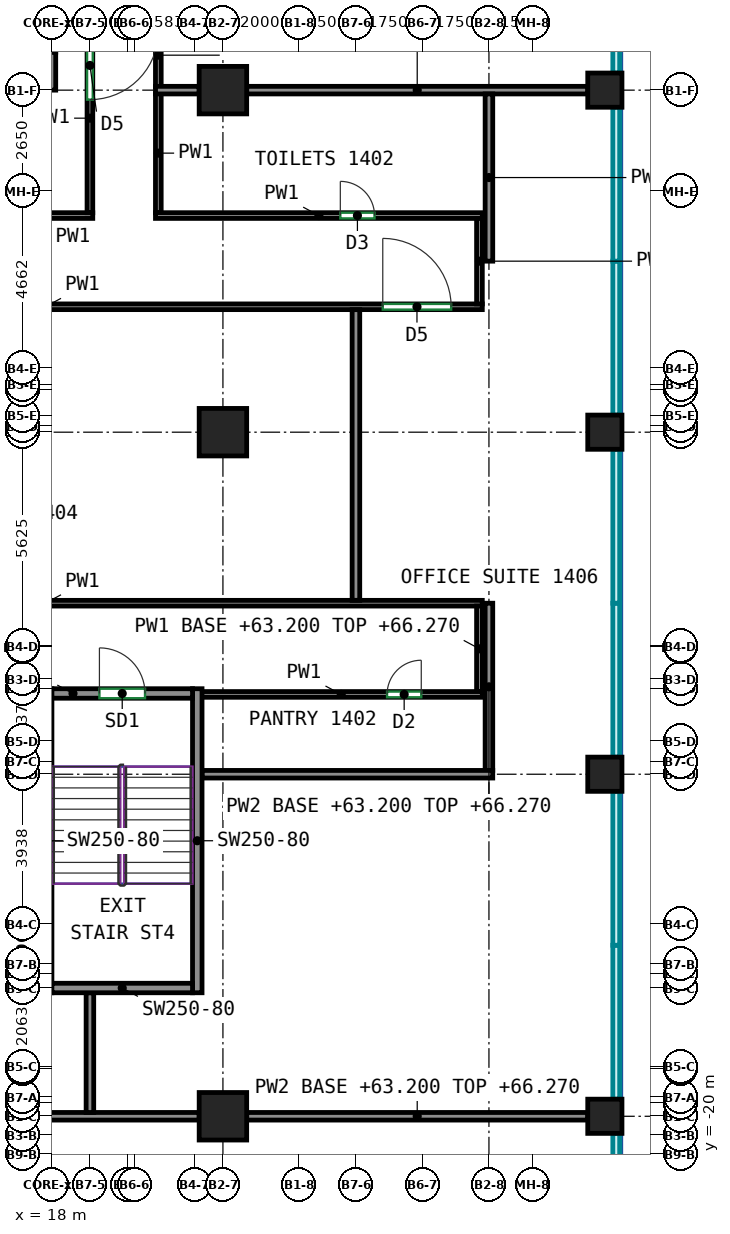
"""IFC4 building model, lengths in metres.
Left out: names, types, materials, properties, quantities, classifications, styles, units other than length and angle.
Written with IfcOpenShell. Run it as: python <this file> out.ifc"""

import sys

from ifc_helpers import new_model, si_unit, direction, frame, frame_2d, origin, origin_2d, place, context, subcontext, project, spatial, rectangle, extrude, source, transform, mapped, element, fill, save


model = new_model("IFC4")
c1 = context("Model", 3, precision=1e-05, world=origin(), true_north=direction((0.0, 1.0)))
c2 = subcontext(c1, "Body", "Model", "MODEL_VIEW")
j1 = project(units=[si_unit("LENGTHUNIT", "METRE"), si_unit("PLANEANGLEUNIT", "RADIAN")], contexts=[c1])
p1 = place(None, origin())
s1 = spatial("IfcSite", under=j1, at=p1, CompositionType="ELEMENT")
p2 = place(p1, origin())
s2 = spatial("IfcBuilding", under=s1, at=p2, CompositionType="ELEMENT")
p3 = place(p2, frame((0.0, 0.0, 63.2)))
s3 = spatial("IfcBuildingStorey", under=s2, at=p3, CompositionType="ELEMENT", Elevation=63.2)
m1 = source(origin(), c2, "Body", "SweptSolid", [
    extrude(rectangle(XDim=1.25, YDim=1.25, at=origin_2d()), origin(), (0.0, 0.0, 1.0), 3.72),
])
for number, where, z_axis, x_axis in (
    (1, (22.5, -19.0, 0.0), (0.0, 0.0, 1.0), (1.0, 0.0, 0.0)),
    (2, (22.5, -1.0, 0.0), (0.0, 0.0, 1.0), (1.0, 0.0, 0.0)),
    (3, (22.5, 8.0, 0.0), (0.0, 0.0, 1.0), (1.0, 0.0, 0.0)),
):
    element("IfcColumn", number, at=place(p3, frame(where, z_axis=z_axis, x_axis=x_axis)), inside=s3, PredefinedType="COLUMN", context=c2, shape_type="MappedRepresentation", body=[
        mapped(m1, transform((0.0, 0.0, 0.0))),
    ])
m2 = source(origin(), c2, "Body", "SweptSolid", [
    extrude(rectangle(XDim=0.9, YDim=0.9, at=origin_2d()), origin(), (0.0, 0.0, 1.0), 3.72),
])
for number, where, z_axis, x_axis in (
    (4, (32.55, -19.0, 0.0), (0.0, 0.0, 1.0), (1.0, 0.0, 0.0)),
    (5, (32.55, -10.0, 0.0), (0.0, 0.0, 1.0), (1.0, 0.0, 0.0)),
    (6, (32.55, -1.0, 0.0), (0.0, 0.0, 1.0), (1.0, 0.0, 0.0)),
    (7, (32.55, 8.0, 0.0), (0.0, 0.0, 1.0), (1.0, 0.0, 0.0)),
):
    element("IfcColumn", number, at=place(p3, frame(where, z_axis=z_axis, x_axis=x_axis)), inside=s3, PredefinedType="COLUMN", context=c2, shape_type="MappedRepresentation", body=[
        mapped(m2, transform((0.0, 0.0, 0.0))),
    ])
m3 = source(origin(), c2, "Body", "SweptSolid", [
    extrude(rectangle(XDim=5.63, YDim=1.0, at=frame_2d((2.815, 0.0))), origin(), (0.0, 0.0, 1.0), 3.72),
])
p4 = place(p3, frame((12.47, 8.5, 0.0), z_axis=(0.0, 0.0, 1.0), x_axis=(1.0, 0.0, 0.0)))
e8 = element("IfcWall", 8, at=p4, inside=s3, PredefinedType="SHEAR", context=c2, shape_type="MappedRepresentation", body=[
    mapped(m3, transform((0.0, 0.0, 0.0))),
])
p5 = place(p4, frame((2.18, 0.0, 0.0)))
e9 = element("IfcOpeningElement", 9, at=p5, cuts=e8, PredefinedType="OPENING", context=c2, shape_type="SweptSolid", body=[
    extrude(rectangle(XDim=1.2, YDim=2.1, at=frame_2d((0.6, 1.05))), frame((0.0, 0.51, 0.0), z_axis=(0.0, -1.0, 0.0), x_axis=(1.0, 0.0, 0.0)), (0.0, 0.0, 1.0), 1.02),
])
m4 = source(origin(), c2, "Body", "SweptSolid", [
    extrude(rectangle(XDim=8.0, YDim=0.25, at=frame_2d((4.0, 0.0))), origin(), (0.0, 0.0, 1.0), 3.72),
])
p6 = place(p3, frame((21.825, -15.75, 0.0), z_axis=(0.0, 0.0, 1.0), x_axis=(0.0, 1.0, 0.0)))
e10 = element("IfcWall", 10, at=p6, inside=s3, PredefinedType="SHEAR", context=c2, shape_type="MappedRepresentation", body=[
    mapped(m4, transform((0.0, 0.0, 0.0))),
])
m5 = source(origin(), c2, "Body", "SweptSolid", [
    extrude(rectangle(XDim=3.7, YDim=0.25, at=frame_2d((1.85, 0.0))), origin(), (0.0, 0.0, 1.0), 3.72),
])
p7 = place(p3, frame((18.0, -15.625, 0.0), z_axis=(0.0, 0.0, 1.0), x_axis=(1.0, 0.0, 0.0)))
e11 = element("IfcWall", 11, at=p7, inside=s3, PredefinedType="SHEAR", context=c2, shape_type="MappedRepresentation", body=[
    mapped(m5, transform((0.0, 0.0, 0.0))),
])
p8 = place(p3, frame((18.0, -7.875, 0.0), z_axis=(0.0, 0.0, 1.0), x_axis=(1.0, 0.0, 0.0)))
e12 = element("IfcWall", 12, at=p8, inside=s3, PredefinedType="SHEAR", context=c2, shape_type="MappedRepresentation", body=[
    mapped(m5, transform((0.0, 0.0, 0.0))),
])
p9 = place(p8, frame((1.25, 0.0, 0.0)))
e13 = element("IfcOpeningElement", 13, at=p9, cuts=e12, PredefinedType="OPENING", context=c2, shape_type="SweptSolid", body=[
    extrude(rectangle(XDim=1.2, YDim=2.1, at=frame_2d((0.6, 1.05))), frame((0.0, 0.135, 0.0), z_axis=(0.0, -1.0, 0.0), x_axis=(1.0, 0.0, 0.0)), (0.0, 0.0, 1.0), 0.27),
])
p10 = place(p3, frame((6.325, 2.3, 0.0), z_axis=(0.0, 0.0, 1.0), x_axis=(1.0, 0.0, 0.0)))
e14 = element("IfcWall", 14, at=p10, inside=s3, PredefinedType="PARTITIONING", context=c2, shape_type="SweptSolid", body=[
    extrude(rectangle(XDim=23.0, YDim=0.15, at=frame_2d((11.5, 0.0))), origin(), (0.0, 0.0, 1.0), 3.72),
])
p11 = place(p10, frame((9.443, 0.0, 0.0)))
e15 = element("IfcOpeningElement", 15, at=p11, cuts=e14, PredefinedType="OPENING", context=c2, shape_type="SweptSolid", body=[
    extrude(rectangle(XDim=1.0, YDim=2.1, at=frame_2d((0.5, 1.05))), frame((0.0, 0.085, 0.0), z_axis=(0.0, -1.0, 0.0), x_axis=(1.0, 0.0, 0.0)), (0.0, 0.0, 1.0), 0.17),
])
p12 = place(p10, frame((20.381, 0.0, 0.0)))
e16 = element("IfcOpeningElement", 16, at=p12, cuts=e14, PredefinedType="OPENING", context=c2, shape_type="SweptSolid", body=[
    extrude(rectangle(XDim=1.8, YDim=2.1, at=frame_2d((0.9, 1.05))), frame((0.0, 0.085, 0.0), z_axis=(0.0, -1.0, 0.0), x_axis=(1.0, 0.0, 0.0)), (0.0, 0.0, 1.0), 0.17),
])
p13 = place(p3, frame((6.325, -5.5, 0.0), z_axis=(0.0, 0.0, 1.0), x_axis=(1.0, 0.0, 0.0)))
e17 = element("IfcWall", 17, at=p13, inside=s3, PredefinedType="PARTITIONING", context=c2, shape_type="SweptSolid", body=[
    extrude(rectangle(XDim=23.0, YDim=0.15, at=frame_2d((11.5, 0.0))), origin(), (0.0, 0.0, 1.0), 3.72),
])
p14 = place(p3, frame((16.075, 4.7, 0.0), z_axis=(0.0, 0.0, 1.0), x_axis=(1.0, 0.0, 0.0)))
e18 = element("IfcWall", 18, at=p14, inside=s3, PredefinedType="PARTITIONING", context=c2, shape_type="SweptSolid", body=[
    extrude(rectangle(XDim=3.0, YDim=0.15, at=frame_2d((1.5, 0.0))), origin(), (0.0, 0.0, 1.0), 3.72),
])
p15 = place(p3, frame((19.0, 9.75, 0.0), z_axis=(0.0, 0.0, 1.0), x_axis=(0.0, -1.0, 0.0)))
e19 = element("IfcWall", 19, at=p15, inside=s3, PredefinedType="PARTITIONING", context=c2, shape_type="SweptSolid", body=[
    extrude(rectangle(XDim=4.975, YDim=0.15, at=frame_2d((2.488, 0.0))), origin(), (0.0, 0.0, 1.0), 3.72),
])
p16 = place(p15, frame((0.2, 0.0, 0.0)))
e20 = element("IfcOpeningElement", 20, at=p16, cuts=e19, PredefinedType="OPENING", context=c2, shape_type="SweptSolid", body=[
    extrude(rectangle(XDim=1.8, YDim=2.1, at=frame_2d((0.9, 1.05))), frame((0.0, 0.085, 0.0), z_axis=(0.0, -1.0, 0.0), x_axis=(1.0, 0.0, 0.0)), (0.0, 0.0, 1.0), 0.17),
])
p17 = place(p3, frame((20.8, 8.09, 0.0), z_axis=(0.0, 0.0, 1.0), x_axis=(0.0, 1.0, 0.0)))
e21 = element("IfcWall", 21, at=p17, inside=s3, PredefinedType="PARTITIONING", context=c2, shape_type="SweptSolid", body=[
    extrude(rectangle(XDim=1.66, YDim=0.15, at=frame_2d((0.83, 0.0))), origin(), (0.0, 0.0, 1.0), 3.72),
])
p18 = place(p3, frame((20.8, 4.775, 0.0), z_axis=(0.0, 0.0, 1.0), x_axis=(0.0, 1.0, 0.0)))
e22 = element("IfcWall", 22, at=p18, inside=s3, PredefinedType="PARTITIONING", context=c2, shape_type="SweptSolid", body=[
    extrude(rectangle(XDim=3.135, YDim=0.15, at=frame_2d((1.567, 0.0))), origin(), (0.0, 0.0, 1.0), 3.72),
])
p19 = place(p3, frame((20.725, 4.7, 0.0), z_axis=(0.0, 0.0, 1.0), x_axis=(1.0, 0.0, 0.0)))
e23 = element("IfcWall", 23, at=p19, inside=s3, PredefinedType="PARTITIONING", context=c2, shape_type="SweptSolid", body=[
    extrude(rectangle(XDim=8.6, YDim=0.15, at=frame_2d((4.3, 0.0))), origin(), (0.0, 0.0, 1.0), 3.72),
])
p20 = place(p19, frame((4.864, 0.0, 0.0)))
e24 = element("IfcOpeningElement", 24, at=p20, cuts=e23, PredefinedType="OPENING", context=c2, shape_type="SweptSolid", body=[
    extrude(rectangle(XDim=0.9, YDim=2.1, at=frame_2d((0.45, 1.05))), frame((0.0, 0.085, 0.0), z_axis=(0.0, -1.0, 0.0), x_axis=(1.0, 0.0, 0.0)), (0.0, 0.0, 1.0), 0.17),
])
p21 = place(p3, frame((29.25, -7.825, 0.0), z_axis=(0.0, 0.0, 1.0), x_axis=(0.0, 1.0, 0.0)))
e25 = element("IfcWall", 25, at=p21, inside=s3, PredefinedType="PARTITIONING", context=c2, shape_type="SweptSolid", body=[
    extrude(rectangle(XDim=2.25, YDim=0.15, at=frame_2d((1.125, 0.0))), origin(), (0.0, 0.0, 1.0), 3.07),
])
p22 = place(p3, frame((21.9, -7.9, 0.0), z_axis=(0.0, 0.0, 1.0), x_axis=(1.0, 0.0, 0.0)))
e26 = element("IfcWall", 26, at=p22, inside=s3, PredefinedType="PARTITIONING", context=c2, shape_type="SweptSolid", body=[
    extrude(rectangle(XDim=7.425, YDim=0.15, at=frame_2d((3.712, 0.0))), origin(), (0.0, 0.0, 1.0), 3.72),
])
p23 = place(p22, frame((4.919, 0.0, 0.0)))
e27 = element("IfcOpeningElement", 27, at=p23, cuts=e26, PredefinedType="OPENING", context=c2, shape_type="SweptSolid", body=[
    extrude(rectangle(XDim=0.9, YDim=2.1, at=frame_2d((0.45, 1.05))), frame((0.0, 0.085, 0.0), z_axis=(0.0, -1.0, 0.0), x_axis=(1.0, 0.0, 0.0)), (0.0, 0.0, 1.0), 0.17),
])
p24 = place(p3, frame((29.25, 2.375, 0.0), z_axis=(0.0, 0.0, 1.0), x_axis=(0.0, 1.0, 0.0)))
e28 = element("IfcWall", 28, at=p24, inside=s3, PredefinedType="PARTITIONING", context=c2, shape_type="SweptSolid", body=[
    extrude(rectangle(XDim=2.25, YDim=0.15, at=frame_2d((1.125, 0.0))), origin(), (0.0, 0.0, 1.0), 3.07),
])
p25 = place(p3, frame((16.125, -19.0, 0.0), z_axis=(0.0, 0.0, 1.0), x_axis=(1.0, 0.0, 0.0)))
e29 = element("IfcWall", 29, at=p25, inside=s3, PredefinedType="PARTITIONING", context=c2, shape_type="SweptSolid", body=[
    extrude(rectangle(XDim=5.75, YDim=0.2, at=frame_2d((2.875, 0.0))), origin(), (0.0, 0.0, 1.0), 3.72),
])
p26 = place(p3, frame((23.125, -19.0, 0.0), z_axis=(0.0, 0.0, 1.0), x_axis=(1.0, 0.0, 0.0)))
e30 = element("IfcWall", 30, at=p26, inside=s3, PredefinedType="PARTITIONING", context=c2, shape_type="SweptSolid", body=[
    extrude(rectangle(XDim=8.975, YDim=0.2, at=frame_2d((4.488, 0.0))), origin(), (0.0, 0.0, 1.0), 3.07),
])
p27 = place(p3, frame((26.0, -5.424, 0.0), z_axis=(0.0, 0.0, 1.0), x_axis=(0.0, 1.0, 0.0)))
e31 = element("IfcWall", 31, at=p27, inside=s3, PredefinedType="PARTITIONING", context=c2, shape_type="SweptSolid", body=[
    extrude(rectangle(XDim=7.648, YDim=0.2, at=frame_2d((3.824, 0.0))), origin(), (0.0, 0.0, 1.0), 3.72),
])
p28 = place(p3, frame((19.0, -18.9, 0.0), z_axis=(0.0, 0.0, 1.0), x_axis=(0.0, 1.0, 0.0)))
e32 = element("IfcWall", 32, at=p28, inside=s3, PredefinedType="PARTITIONING", context=c2, shape_type="SweptSolid", body=[
    extrude(rectangle(XDim=3.15, YDim=0.2, at=frame_2d((1.575, 0.0))), origin(), (0.0, 0.0, 1.0), 3.72),
])
p29 = place(p3, frame((23.125, 8.0, 0.0), z_axis=(0.0, 0.0, 1.0), x_axis=(1.0, 0.0, 0.0)))
e33 = element("IfcWall", 33, at=p29, inside=s3, PredefinedType="PARTITIONING", context=c2, shape_type="SweptSolid", body=[
    extrude(rectangle(XDim=8.975, YDim=0.2, at=frame_2d((4.488, 0.0))), origin(), (0.0, 0.0, 1.0), 3.07),
])
p30 = place(p3, frame((20.726, 8.0, 0.0), z_axis=(0.0, 0.0, 1.0), x_axis=(1.0, 0.0, 0.0)))
e34 = element("IfcWall", 34, at=p30, inside=s3, PredefinedType="PARTITIONING", context=c2, shape_type="SweptSolid", body=[
    extrude(rectangle(XDim=1.149, YDim=0.2, at=frame_2d((0.574, 0.0))), origin(), (0.0, 0.0, 1.0), 3.72),
])
for number, where, z_axis, x_axis in (
    (35, (29.5, 3.5, 0.0), (0.0, 0.0, 1.0), (0.0, 1.0, 0.0)),
    (36, (29.5, -9.9, 0.0), (0.0, 0.0, 1.0), (0.0, 1.0, 0.0)),
):
    element("IfcWall", number, at=place(p3, frame(where, z_axis=z_axis, x_axis=x_axis)), inside=s3, PredefinedType="PARTITIONING", context=c2, shape_type="SweptSolid", body=[
        extrude(rectangle(XDim=4.4, YDim=0.2, at=frame_2d((2.2, 0.0))), origin(), (0.0, 0.0, 1.0), 3.07),
    ])
p31 = place(p3, frame((21.95, -10.0, 0.0), z_axis=(0.0, 0.0, 1.0), x_axis=(1.0, 0.0, 0.0)))
e37 = element("IfcWall", 37, at=p31, inside=s3, PredefinedType="PARTITIONING", context=c2, shape_type="SweptSolid", body=[
    extrude(rectangle(XDim=7.65, YDim=0.2, at=frame_2d((3.825, 0.0))), origin(), (0.0, 0.0, 1.0), 3.72),
])
p32 = place(p9, origin())
e38 = element("IfcDoor", 38, at=p32, inside=s3, OperationType="DOUBLE_DOOR_SINGLE_SWING", PredefinedType="DOOR", context=c2, shape_type="SweptSolid", body=[
    extrude(rectangle(XDim=1.2, YDim=2.1, at=frame_2d((0.6, 1.05))), frame((0.0, 0.025, 0.0), z_axis=(0.0, -1.0, 0.0), x_axis=(1.0, 0.0, 0.0)), (0.0, 0.0, 1.0), 0.05),
])
fill(e13, e38)
p33 = place(p23, origin())
e39 = element("IfcDoor", 39, at=p33, inside=s3, OperationType="SINGLE_SWING_RIGHT", PredefinedType="DOOR", context=c2, shape_type="SweptSolid", body=[
    extrude(rectangle(XDim=0.9, YDim=2.1, at=frame_2d((0.45, 1.05))), frame((0.0, 0.025, 0.0), z_axis=(0.0, -1.0, 0.0), x_axis=(1.0, 0.0, 0.0)), (0.0, 0.0, 1.0), 0.05),
])
fill(e27, e39)
p34 = place(p12, origin())
e40 = element("IfcDoor", 40, at=p34, inside=s3, OperationType="DOUBLE_DOOR_SINGLE_SWING", PredefinedType="DOOR", context=c2, shape_type="SweptSolid", body=[
    extrude(rectangle(XDim=1.8, YDim=2.1, at=frame_2d((0.9, 1.05))), frame((0.0, 0.025, 0.0), z_axis=(0.0, -1.0, 0.0), x_axis=(1.0, 0.0, 0.0)), (0.0, 0.0, 1.0), 0.05),
])
fill(e16, e40)
p35 = place(p20, origin())
e41 = element("IfcDoor", 41, at=p35, inside=s3, OperationType="SINGLE_SWING_LEFT", PredefinedType="DOOR", context=c2, shape_type="SweptSolid", body=[
    extrude(rectangle(XDim=0.9, YDim=2.1, at=frame_2d((0.45, 1.05))), frame((0.0, 0.025, 0.0), z_axis=(0.0, -1.0, 0.0), x_axis=(1.0, 0.0, 0.0)), (0.0, 0.0, 1.0), 0.05),
])
fill(e24, e41)
p36 = place(p16, origin())
e42 = element("IfcDoor", 42, at=p36, inside=s3, OperationType="DOUBLE_DOOR_SINGLE_SWING", PredefinedType="DOOR", context=c2, shape_type="SweptSolid", body=[
    extrude(rectangle(XDim=1.8, YDim=2.1, at=frame_2d((0.9, 1.05))), frame((0.0, 0.025, 0.0), z_axis=(0.0, -1.0, 0.0), x_axis=(1.0, 0.0, 0.0)), (0.0, 0.0, 1.0), 0.05),
])
fill(e20, e42)
save(model, sys.argv[1])
